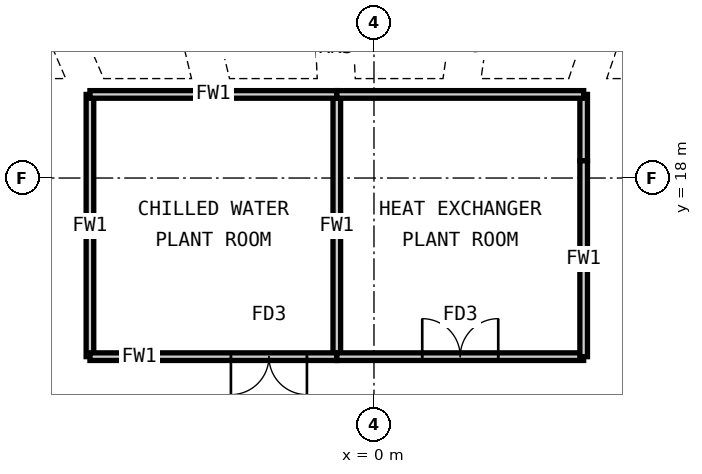
"""IFC4 building model, lengths in metres.
Left out: names, types, materials, properties, quantities, classifications, styles, units other than length and angle.
Written with IfcOpenShell. Run it as: python <this file> out.ifc"""

import sys

from ifc_helpers import new_model, si_unit, direction, frame, frame_2d, origin, origin_2d, place, context, subcontext, project, spatial, rectangle, hollow_rectangle, extrude, clip, halfspace, element, fill, save


model = new_model("IFC4")
c1 = context("Model", 3, precision=1e-05, world=origin(), true_north=direction((0.0, 1.0)))
c2 = subcontext(c1, "Body", "Model", "MODEL_VIEW")
j1 = project(units=[si_unit("LENGTHUNIT", "METRE"), si_unit("PLANEANGLEUNIT", "RADIAN")], contexts=[c1])
p1 = place(None, origin())
s1 = spatial("IfcSite", under=j1, at=p1, CompositionType="ELEMENT")
p2 = place(p1, origin())
s2 = spatial("IfcBuilding", under=s1, at=p2, CompositionType="ELEMENT")
p3 = place(p2, frame((0.0, 0.0, 256.0)))
s3 = spatial("IfcBuildingStorey", under=s2, at=p3, CompositionType="ELEMENT", Elevation=256.0)
p4 = place(p3, frame((-8.338, 23.0, 0.0), z_axis=(0.13539287358, -0.313315937958, 0.939947813873), x_axis=(-0.917958510973, -0.39667640733, 0.0)))
e1 = element("IfcColumn", 1, at=p4, inside=s3, PredefinedType="COLUMN", context=c2, shape_type="Clipping", body=[
    clip(clip(extrude(hollow_rectangle(XDim=1.0, YDim=1.0, WallThickness=0.08, at=origin_2d()), origin(), (0.0, 0.0, 1.0), 6.383), halfspace(frame((0.0, 0.0, 0.181), z_axis=(0.0, 0.0, -1.0), x_axis=(0.0, -1.0, 0.0)), False)), halfspace(frame((0.0, 0.0, 6.202), z_axis=(0.0, 0.0, 1.0), x_axis=(0.0, 1.0, 0.0)), False)),
])
p5 = place(p3, frame((-4.705, 23.0, 0.0), z_axis=(0.075444333791, -0.31532652164, 0.945979564921), x_axis=(-0.972550863164, -0.232690392066, 0.0)))
e2 = element("IfcColumn", 2, at=p5, inside=s3, PredefinedType="COLUMN", context=c2, shape_type="Clipping", body=[
    clip(clip(extrude(hollow_rectangle(XDim=1.0, YDim=1.0, WallThickness=0.08, at=origin_2d()), origin(), (0.0, 0.0, 1.0), 6.343), halfspace(frame((0.0, 0.0, 0.171), z_axis=(0.0, 0.0, -1.0), x_axis=(0.0, -1.0, 0.0)), False)), halfspace(frame((0.0, 0.0, 6.172), z_axis=(0.0, 0.0, 1.0), x_axis=(0.0, 1.0, 0.0)), False)),
])
p6 = place(p3, frame((-1.071, 23.0, 0.0), z_axis=(0.014705780072, -0.316193570465, 0.948580711394), x_axis=(-0.998920217686, -0.046458569695, 0.0)))
e3 = element("IfcColumn", 3, at=p6, inside=s3, PredefinedType="COLUMN", context=c2, shape_type="Clipping", body=[
    clip(clip(extrude(hollow_rectangle(XDim=1.0, YDim=1.0, WallThickness=0.08, at=origin_2d()), origin(), (0.0, 0.0, 1.0), 6.325), halfspace(frame((0.0, 0.0, 0.165), z_axis=(0.0, 0.0, -1.0), x_axis=(0.0, -1.0, 0.0)), False)), halfspace(frame((0.0, 0.0, 6.16), z_axis=(0.0, 0.0, 1.0), x_axis=(0.0, 1.0, 0.0)), False)),
])
p7 = place(p3, frame((2.562, 23.0, 0.0), z_axis=(-0.046195851301, -0.315890161816, 0.947670485449), x_axis=(-0.989475410036, 0.144701115872, 0.0)))
e4 = element("IfcColumn", 4, at=p7, inside=s3, PredefinedType="COLUMN", context=c2, shape_type="Clipping", body=[
    clip(clip(extrude(hollow_rectangle(XDim=1.0, YDim=1.0, WallThickness=0.08, at=origin_2d()), origin(), (0.0, 0.0, 1.0), 6.331), halfspace(frame((0.0, 0.0, 0.168), z_axis=(0.0, 0.0, -1.0), x_axis=(0.0, -1.0, 0.0)), False)), halfspace(frame((0.0, 0.0, 6.163), z_axis=(0.0, 0.0, 1.0), x_axis=(0.0, 1.0, 0.0)), False)),
])
p8 = place(p3, frame((6.196, 23.0, 0.0), z_axis=(-0.106587148769, -0.31442633155, 0.943278994649), x_axis=(-0.947064092103, 0.321044553683, 0.0)))
e5 = element("IfcColumn", 5, at=p8, inside=s3, PredefinedType="COLUMN", context=c2, shape_type="Clipping", body=[
    clip(clip(extrude(hollow_rectangle(XDim=1.0, YDim=1.0, WallThickness=0.08, at=origin_2d()), origin(), (0.0, 0.0, 1.0), 6.361), halfspace(frame((0.0, 0.0, 0.176), z_axis=(0.0, 0.0, -1.0), x_axis=(0.0, -1.0, 0.0)), False)), halfspace(frame((0.0, 0.0, 6.185), z_axis=(0.0, 0.0, 1.0), x_axis=(0.0, 1.0, 0.0)), False)),
])
p9 = place(p3, frame((-7.474, 20.2, 0.0), z_axis=(0.0, 0.0, 1.0), x_axis=(0.0, -1.0, 0.0)))
e6 = element("IfcWall", 6, at=p9, inside=s3, PredefinedType="PARTITIONING", context=c2, shape_type="SweptSolid", body=[
    extrude(rectangle(XDim=6.9, YDim=0.2, at=frame_2d((3.45, 0.0))), origin(), (0.0, 0.0, 1.0), 5.83),
])
p10 = place(p3, frame((-0.978, 20.2, 0.0), z_axis=(0.0, 0.0, 1.0), x_axis=(0.0, -1.0, 0.0)))
e7 = element("IfcWall", 7, at=p10, inside=s3, PredefinedType="PARTITIONING", context=c2, shape_type="SweptSolid", body=[
    extrude(rectangle(XDim=6.9, YDim=0.2, at=frame_2d((3.45, 0.0))), origin(), (0.0, 0.0, 1.0), 4.63),
])
p11 = place(p3, frame((-7.474, 13.3, 0.0), z_axis=(0.0, 0.0, 1.0), x_axis=(1.0, 0.0, 0.0)))
e8 = element("IfcWall", 8, at=p11, inside=s3, PredefinedType="PARTITIONING", context=c2, shape_type="SweptSolid", body=[
    extrude(rectangle(XDim=6.496, YDim=0.2, at=frame_2d((3.248, 0.0))), origin(), (0.0, 0.0, 1.0), 5.83),
])
p12 = place(p11, frame((3.71, 0.0, 0.0)))
e9 = element("IfcOpeningElement", 9, at=p12, cuts=e8, PredefinedType="OPENING", context=c2, shape_type="SweptSolid", body=[
    extrude(rectangle(XDim=2.0, YDim=2.4, at=frame_2d((1.0, 1.2))), frame((0.0, 0.11, 0.0), z_axis=(0.0, -1.0, 0.0), x_axis=(1.0, 0.0, 0.0)), (0.0, 0.0, 1.0), 0.22),
])
p13 = place(p3, frame((5.518, 20.2, 0.0), z_axis=(0.0, 0.0, 1.0), x_axis=(0.0, -1.0, 0.0)))
e10 = element("IfcWall", 10, at=p13, inside=s3, PredefinedType="PARTITIONING", context=c2, shape_type="SweptSolid", body=[
    extrude(rectangle(XDim=1.745, YDim=0.2, at=frame_2d((0.873, 0.0))), origin(), (0.0, 0.0, 1.0), 4.73),
])
p14 = place(p3, frame((-0.978, 13.3, 0.0), z_axis=(0.0, 0.0, 1.0), x_axis=(1.0, 0.0, 0.0)))
e11 = element("IfcWall", 11, at=p14, inside=s3, PredefinedType="PARTITIONING", context=c2, shape_type="SweptSolid", body=[
    extrude(rectangle(XDim=6.496, YDim=0.2, at=frame_2d((3.248, 0.0))), origin(), (0.0, 0.0, 1.0), 5.83),
])
p15 = place(p14, frame((2.248, 0.0, 0.0)))
e12 = element("IfcOpeningElement", 12, at=p15, cuts=e11, PredefinedType="OPENING", context=c2, shape_type="SweptSolid", body=[
    extrude(rectangle(XDim=2.0, YDim=2.4, at=frame_2d((1.0, 1.2))), frame((0.0, 0.11, 0.0), z_axis=(0.0, -1.0, 0.0), x_axis=(1.0, 0.0, 0.0)), (0.0, 0.0, 1.0), 0.22),
])
p16 = place(p3, frame((-7.474, 20.2, 0.0), z_axis=(0.0, 0.0, 1.0), x_axis=(1.0, 0.0, 0.0)))
e13 = element("IfcWall", 13, at=p16, inside=s3, PredefinedType="PARTITIONING", context=c2, shape_type="SweptSolid", body=[
    extrude(rectangle(XDim=6.496, YDim=0.2, at=frame_2d((3.248, 0.0))), origin(), (0.0, 0.0, 1.0), 5.83),
])
p17 = place(p3, frame((-0.978, 20.2, 0.0), z_axis=(0.0, 0.0, 1.0), x_axis=(1.0, 0.0, 0.0)))
e14 = element("IfcWall", 14, at=p17, inside=s3, PredefinedType="PARTITIONING", context=c2, shape_type="SweptSolid", body=[
    extrude(rectangle(XDim=6.496, YDim=0.2, at=frame_2d((3.248, 0.0))), origin(), (0.0, 0.0, 1.0), 5.83),
])
p18 = place(p3, frame((5.518, 18.455, 0.0), z_axis=(0.0, 0.0, 1.0), x_axis=(0.0, -1.0, 0.0)))
e15 = element("IfcWall", 15, at=p18, inside=s3, PredefinedType="PARTITIONING", context=c2, shape_type="SweptSolid", body=[
    extrude(rectangle(XDim=5.155, YDim=0.2, at=frame_2d((2.578, 0.0))), origin(), (0.0, 0.0, 1.0), 5.83),
])
p19 = place(p12, origin())
e16 = element("IfcDoor", 16, at=p19, inside=s3, OperationType="DOUBLE_DOOR_DOUBLE_SWING", PredefinedType="DOOR", context=c2, shape_type="SweptSolid", body=[
    extrude(rectangle(XDim=2.0, YDim=2.4, at=frame_2d((1.0, 1.2))), frame((0.0, 0.025, 0.0), z_axis=(0.0, -1.0, 0.0), x_axis=(1.0, 0.0, 0.0)), (0.0, 0.0, 1.0), 0.05),
])
fill(e9, e16)
p20 = place(p15, origin())
e17 = element("IfcDoor", 17, at=p20, inside=s3, OperationType="DOUBLE_DOOR_DOUBLE_SWING", PredefinedType="DOOR", context=c2, shape_type="SweptSolid", body=[
    extrude(rectangle(XDim=2.0, YDim=2.4, at=frame_2d((1.0, 1.2))), frame((0.0, 0.025, 0.0), z_axis=(0.0, -1.0, 0.0), x_axis=(1.0, 0.0, 0.0)), (0.0, 0.0, 1.0), 0.05),
])
fill(e12, e17)
save(model, sys.argv[1])
